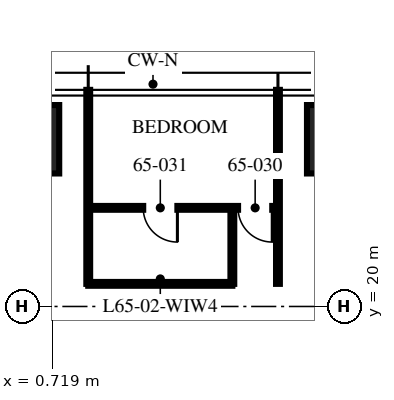
"""IFC4 building model, lengths in metres.
Left out: names, types, materials, properties, quantities, classifications, styles, units other than length and angle.
Written with IfcOpenShell. Run it as: python <this file> out.ifc"""

import sys

from ifc_helpers import new_model, si_unit, direction, frame, frame_2d, origin, origin_2d, place, context, subcontext, project, spatial, rectangle, extrude, element, fill, save


model = new_model("IFC4")
c1 = context("Model", 3, precision=1e-05, world=origin(), true_north=direction((0.0, 1.0)))
c2 = subcontext(c1, "Body", "Model", "MODEL_VIEW")
j1 = project(units=[si_unit("LENGTHUNIT", "METRE"), si_unit("PLANEANGLEUNIT", "RADIAN")], contexts=[c1])
p1 = place(None, origin())
s1 = spatial("IfcSite", under=j1, at=p1, CompositionType="ELEMENT")
p2 = place(p1, origin())
s2 = spatial("IfcBuilding", under=s1, at=p2, CompositionType="ELEMENT")
p3 = place(p2, frame((0.0, 0.0, 259.5)))
s3 = spatial("IfcBuildingStorey", under=s2, at=p3, CompositionType="ELEMENT", Elevation=259.5)
for number, where, z_axis, x_axis in (
    (1, (0.0, 24.4, 0.0), (0.0, 0.0, 1.0), (1.0, 0.0, 0.0)),
    (2, (8.32, 24.4, 0.0), (0.0, 0.0, 1.0), (1.0, 0.0, 0.0)),
):
    element("IfcColumn", number, at=place(p3, frame(where, z_axis=z_axis, x_axis=x_axis)), inside=s3, PredefinedType="COLUMN", context=c2, shape_type="SweptSolid", body=[
        extrude(rectangle(XDim=1.8, YDim=1.8, at=origin_2d()), origin(), (0.0, 0.0, 1.0), 3.75),
    ])
for number, where, z_axis, x_axis in (
    (3, (6.656, 20.595, 0.0), (0.0, 0.0, 1.0), (0.0, 1.0, 0.0)),
    (4, (1.664, 20.595, 0.0), (0.0, 0.0, 1.0), (0.0, 1.0, 0.0)),
):
    element("IfcWall", number, at=place(p3, frame(where, z_axis=z_axis, x_axis=x_axis)), inside=s3, PredefinedType="PARTITIONING", context=c2, shape_type="SweptSolid", body=[
        extrude(rectangle(XDim=5.105, YDim=0.1, at=frame_2d((2.552, 0.0))), origin(), (0.0, 0.0, 1.0), 2.91),
    ])
p4 = place(p3, frame((6.656, 22.595, 0.0), z_axis=(0.0, 0.0, 1.0), x_axis=(-1.0, 0.0, 0.0)))
e5 = element("IfcWall", 5, at=p4, inside=s3, PredefinedType="PARTITIONING", context=c2, shape_type="SweptSolid", body=[
    extrude(rectangle(XDim=4.992, YDim=0.1, at=frame_2d((2.496, 0.0))), origin(), (0.0, 0.0, 1.0), 2.81),
])
p5 = place(p4, frame((0.15, 0.0, 0.0)))
e6 = element("IfcOpeningElement", 6, at=p5, cuts=e5, PredefinedType="OPENING", context=c2, shape_type="SweptSolid", body=[
    extrude(rectangle(XDim=0.9, YDim=2.1, at=frame_2d((0.45, 1.05))), frame((0.0, 0.06, 0.0), z_axis=(0.0, -1.0, 0.0), x_axis=(1.0, 0.0, 0.0)), (0.0, 0.0, 1.0), 0.12),
])
p6 = place(p4, frame((2.646, 0.0, 0.0)))
e7 = element("IfcOpeningElement", 7, at=p6, cuts=e5, PredefinedType="OPENING", context=c2, shape_type="SweptSolid", body=[
    extrude(rectangle(XDim=0.9, YDim=2.1, at=frame_2d((0.45, 1.05))), frame((0.0, 0.06, 0.0), z_axis=(0.0, -1.0, 0.0), x_axis=(1.0, 0.0, 0.0)), (0.0, 0.0, 1.0), 0.12),
])
p7 = place(p3, frame((5.456, 20.595, 0.0), z_axis=(0.0, 0.0, 1.0), x_axis=(0.0, 1.0, 0.0)))
e8 = element("IfcWall", 8, at=p7, inside=s3, PredefinedType="PARTITIONING", context=c2, shape_type="SweptSolid", body=[
    extrude(rectangle(XDim=2.0, YDim=0.1, at=frame_2d((1.0, 0.0))), origin(), (0.0, 0.0, 1.0), 3.5),
])
p8 = place(p3, frame((5.456, 20.595, 0.0), z_axis=(0.0, 0.0, 1.0), x_axis=(-1.0, 0.0, 0.0)))
e9 = element("IfcWall", 9, at=p8, inside=s3, PredefinedType="PARTITIONING", context=c2, shape_type="SweptSolid", body=[
    extrude(rectangle(XDim=3.792, YDim=0.1, at=frame_2d((1.896, 0.0))), origin(), (0.0, 0.0, 1.0), 2.81),
])
p9 = place(p5, origin())
e10 = element("IfcDoor", 10, at=p9, inside=s3, OperationType="SINGLE_SWING_LEFT", PredefinedType="DOOR", context=c2, shape_type="SweptSolid", body=[
    extrude(rectangle(XDim=0.9, YDim=2.1, at=frame_2d((0.45, 1.05))), frame((0.0, 0.025, 0.0), z_axis=(0.0, -1.0, 0.0), x_axis=(1.0, 0.0, 0.0)), (0.0, 0.0, 1.0), 0.05),
])
fill(e6, e10)
p10 = place(p6, origin())
e11 = element("IfcDoor", 11, at=p10, inside=s3, OperationType="SINGLE_SWING_LEFT", PredefinedType="DOOR", context=c2, shape_type="SweptSolid", body=[
    extrude(rectangle(XDim=0.9, YDim=2.1, at=frame_2d((0.45, 1.05))), frame((0.0, 0.025, 0.0), z_axis=(0.0, -1.0, 0.0), x_axis=(1.0, 0.0, 0.0)), (0.0, 0.0, 1.0), 0.05),
])
fill(e7, e11)
save(model, sys.argv[1])
